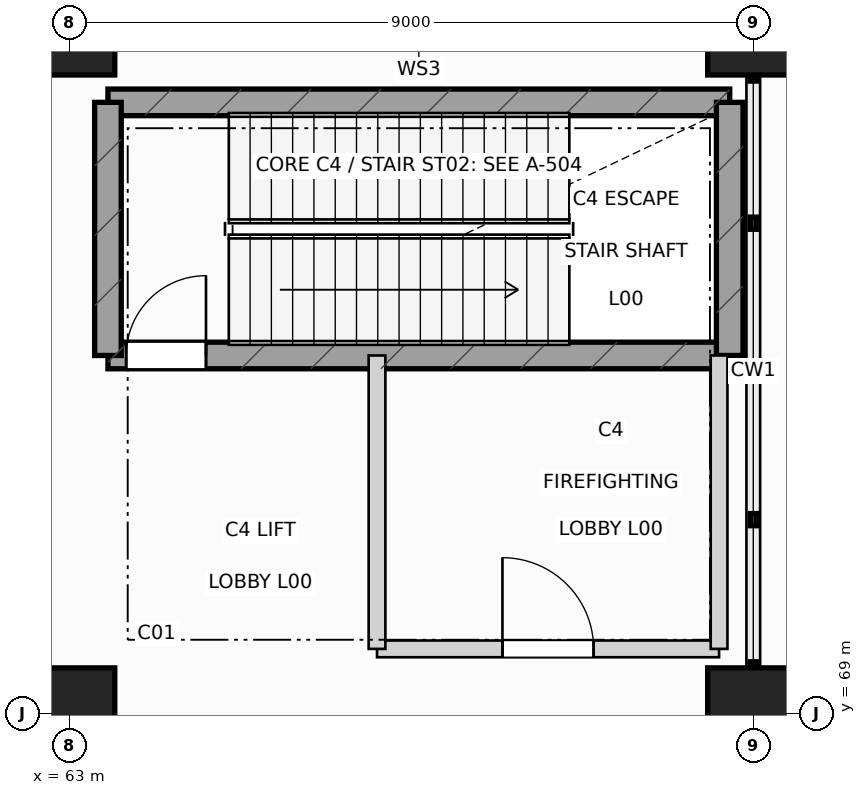
"""IFC4 building model, lengths in metres.
Left out: names, types, materials, properties, quantities, classifications, styles, units other than length and angle.
Written with IfcOpenShell. Run it as: python <this file> out.ifc"""

import sys

from ifc_helpers import new_model, si_unit, direction, frame, frame_2d, origin, origin_2d, place, context, subcontext, project, spatial, rectangle, extrude, element, fill, save


model = new_model("IFC4")
c1 = context("Model", 3, precision=1e-05, world=origin(), true_north=direction((0.0, 1.0)))
c2 = subcontext(c1, "Body", "Model", "MODEL_VIEW")
j1 = project(units=[si_unit("LENGTHUNIT", "METRE"), si_unit("PLANEANGLEUNIT", "RADIAN")], contexts=[c1])
p1 = place(None, origin())
s1 = spatial("IfcSite", under=j1, at=p1, CompositionType="ELEMENT")
p2 = place(p1, origin())
s2 = spatial("IfcBuilding", under=s1, at=p2, CompositionType="ELEMENT")
p3 = place(p2, origin())
s3 = spatial("IfcBuildingStorey", under=s2, at=p3, CompositionType="ELEMENT", Elevation=0.0)
for number, where, z_axis, x_axis in (
    (1, (63.0, 69.0, 0.0), (0.0, 0.0, 1.0), (1.0, 0.0, 0.0)),
    (2, (63.0, 78.0, 0.0), (0.0, 0.0, 1.0), (1.0, 0.0, 0.0)),
    (3, (72.0, 69.0, 0.0), (0.0, 0.0, 1.0), (1.0, 0.0, 0.0)),
    (4, (72.0, 78.0, 0.0), (0.0, 0.0, 1.0), (1.0, 0.0, 0.0)),
):
    element("IfcColumn", number, at=place(p3, frame(where, z_axis=z_axis, x_axis=x_axis)), inside=s3, PredefinedType="COLUMN", context=c2, shape_type="SweptSolid", body=[
        extrude(rectangle(XDim=1.2, YDim=1.2, at=origin_2d()), origin(), (0.0, 0.0, 1.0), 6.0),
    ])
p4 = place(p3, frame((63.51, 73.71, 0.0), z_axis=(0.0, 0.0, 1.0), x_axis=(1.0, 0.0, 0.0)))
e5 = element("IfcWall", 5, at=p4, inside=s3, PredefinedType="SHEAR", context=c2, shape_type="SweptSolid", body=[
    extrude(rectangle(XDim=8.18, YDim=0.35, at=frame_2d((4.09, 0.0))), origin(), (0.0, 0.0, 1.0), 5.7),
])
p5 = place(p4, frame((0.24, 0.0, 0.0)))
e6 = element("IfcOpeningElement", 6, at=p5, cuts=e5, PredefinedType="OPENING", context=c2, shape_type="SweptSolid", body=[
    extrude(rectangle(XDim=1.05, YDim=2.18, at=frame_2d((0.525, 1.09))), frame((0.0, 0.185, 0.0), z_axis=(0.0, -1.0, 0.0), x_axis=(1.0, 0.0, 0.0)), (0.0, 0.0, 1.0), 0.37),
])
p6 = place(p3, frame((63.51, 77.04, 0.0), z_axis=(0.0, 0.0, 1.0), x_axis=(1.0, 0.0, 0.0)))
e7 = element("IfcWall", 7, at=p6, inside=s3, PredefinedType="SHEAR", context=c2, shape_type="SweptSolid", body=[
    extrude(rectangle(XDim=8.18, YDim=0.35, at=frame_2d((4.09, 0.0))), origin(), (0.0, 0.0, 1.0), 5.7),
])
for number, where, z_axis, x_axis in (
    (8, (63.51, 73.71, 0.0), (0.0, 0.0, 1.0), (0.0, 1.0, 0.0)),
    (9, (71.69, 73.71, 0.0), (0.0, 0.0, 1.0), (0.0, 1.0, 0.0)),
):
    element("IfcWall", number, at=place(p3, frame(where, z_axis=z_axis, x_axis=x_axis)), inside=s3, PredefinedType="SHEAR", context=c2, shape_type="SweptSolid", body=[
        extrude(rectangle(XDim=3.33, YDim=0.35, at=frame_2d((1.665, 0.0))), origin(), (0.0, 0.0, 1.0), 5.7),
    ])
p7 = place(p3, frame((67.05, 69.85, 0.0), z_axis=(0.0, 0.0, 1.0), x_axis=(1.0, 0.0, 0.0)))
e10 = element("IfcWall", 10, at=p7, inside=s3, PredefinedType="PARTITIONING", context=c2, shape_type="SweptSolid", body=[
    extrude(rectangle(XDim=4.5, YDim=0.22, at=frame_2d((2.25, 0.0))), origin(), (0.0, 0.0, 1.0), 5.065),
])
p8 = place(p7, frame((1.65, 0.0, 0.0)))
e11 = element("IfcOpeningElement", 11, at=p8, cuts=e10, PredefinedType="OPENING", context=c2, shape_type="SweptSolid", body=[
    extrude(rectangle(XDim=1.2, YDim=2.18, at=frame_2d((0.6, 1.09))), frame((0.0, 0.12, 0.0), z_axis=(0.0, -1.0, 0.0), x_axis=(1.0, 0.0, 0.0)), (0.0, 0.0, 1.0), 0.24),
])
p9 = place(p3, frame((67.05, 69.85, 0.0), z_axis=(0.0, 0.0, 1.0), x_axis=(0.0, 1.0, 0.0)))
e12 = element("IfcWall", 12, at=p9, inside=s3, PredefinedType="PARTITIONING", context=c2, shape_type="SweptSolid", body=[
    extrude(rectangle(XDim=3.86, YDim=0.22, at=frame_2d((1.93, 0.0))), origin(), (0.0, 0.0, 1.0), 5.215),
])
p10 = place(p3, frame((71.55, 69.85, 0.0), z_axis=(0.0, 0.0, 1.0), x_axis=(0.0, 1.0, 0.0)))
e13 = element("IfcWall", 13, at=p10, inside=s3, PredefinedType="PARTITIONING", context=c2, shape_type="SweptSolid", body=[
    extrude(rectangle(XDim=3.86, YDim=0.22, at=frame_2d((1.93, 0.0))), origin(), (0.0, 0.0, 1.0), 5.065),
])
p11 = place(p5, origin())
e14 = element("IfcDoor", 14, at=p11, inside=s3, OperationType="SINGLE_SWING_RIGHT", PredefinedType="DOOR", context=c2, shape_type="SweptSolid", body=[
    extrude(rectangle(XDim=1.05, YDim=2.18, at=frame_2d((0.525, 1.09))), frame((0.0, 0.025, 0.0), z_axis=(0.0, -1.0, 0.0), x_axis=(1.0, 0.0, 0.0)), (0.0, 0.0, 1.0), 0.05),
])
fill(e6, e14)
p12 = place(p8, origin())
e15 = element("IfcDoor", 15, at=p12, inside=s3, OperationType="SINGLE_SWING_LEFT", PredefinedType="DOOR", context=c2, shape_type="SweptSolid", body=[
    extrude(rectangle(XDim=1.2, YDim=2.18, at=frame_2d((0.6, 1.09))), frame((0.0, 0.025, 0.0), z_axis=(0.0, -1.0, 0.0), x_axis=(1.0, 0.0, 0.0)), (0.0, 0.0, 1.0), 0.05),
])
fill(e11, e15)
save(model, sys.argv[1])
